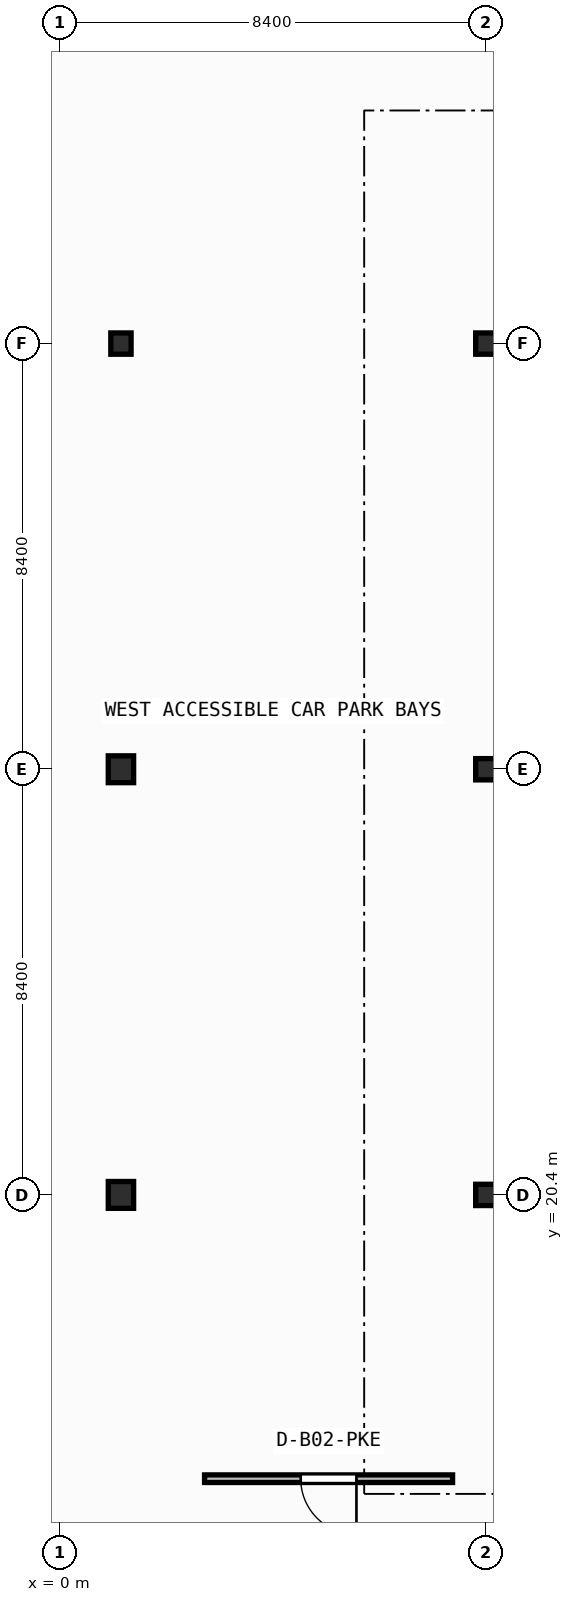
"""IFC4 building model, lengths in metres.
Left out: names, types, materials, properties, quantities, classifications, styles, units other than length and angle.
Written with IfcOpenShell. Run it as: python <this file> out.ifc"""

import sys

from ifc_helpers import new_model, si_unit, direction, frame, frame_2d, origin, origin_2d, place, context, subcontext, project, spatial, rectangle, i_section, extrude, element, fill, save


model = new_model("IFC4")
c1 = context("Model", 3, precision=1e-05, world=origin(), true_north=direction((0.0, 1.0)))
c2 = subcontext(c1, "Body", "Model", "MODEL_VIEW")
j1 = project(units=[si_unit("LENGTHUNIT", "METRE"), si_unit("PLANEANGLEUNIT", "RADIAN")], contexts=[c1])
p1 = place(None, origin())
s1 = spatial("IfcSite", under=j1, at=p1, CompositionType="ELEMENT")
p2 = place(p1, origin())
s2 = spatial("IfcBuilding", under=s1, at=p2, CompositionType="ELEMENT")
p3 = place(p2, frame((0.0, 0.0, -9.0)))
s3 = spatial("IfcBuildingStorey", under=s2, at=p3, CompositionType="ELEMENT", Elevation=-9.0)
p4 = place(p3, frame((1.2, 20.4, 0.0), z_axis=(0.0, 0.0, 1.0), x_axis=(1.0, 0.0, 0.0)))
e1 = element("IfcColumn", 1, at=p4, inside=s3, PredefinedType="COLUMN", context=c2, shape_type="SweptSolid", body=[
    extrude(i_section(OverallWidth=0.5, OverallDepth=0.53, WebThickness=0.028, FlangeThickness=0.045, at=origin_2d()), origin(), (0.0, 0.0, 1.0), 4.5),
])
p5 = place(p3, frame((8.4, 20.4, 0.0), z_axis=(0.0, 0.0, 1.0), x_axis=(1.0, 0.0, 0.0)))
e2 = element("IfcColumn", 2, at=p5, inside=s3, PredefinedType="COLUMN", context=c2, shape_type="SweptSolid", body=[
    extrude(i_section(OverallWidth=0.4, OverallDepth=0.42, WebThickness=0.025, FlangeThickness=0.04, at=origin_2d()), origin(), (0.0, 0.0, 1.0), 4.5),
])
p6 = place(p3, frame((1.2, 28.8, 0.0), z_axis=(0.0, 0.0, 1.0), x_axis=(1.0, 0.0, 0.0)))
e3 = element("IfcColumn", 3, at=p6, inside=s3, PredefinedType="COLUMN", context=c2, shape_type="SweptSolid", body=[
    extrude(i_section(OverallWidth=0.5, OverallDepth=0.53, WebThickness=0.028, FlangeThickness=0.045, at=origin_2d()), origin(), (0.0, 0.0, 1.0), 4.5),
])
for number, where, z_axis, x_axis in (
    (4, (8.4, 28.8, 0.0), (0.0, 0.0, 1.0), (1.0, 0.0, 0.0)),
    (5, (1.2, 37.2, 0.0), (0.0, 0.0, 1.0), (1.0, 0.0, 0.0)),
    (6, (8.4, 37.2, 0.0), (0.0, 0.0, 1.0), (1.0, 0.0, 0.0)),
):
    element("IfcColumn", number, at=place(p3, frame(where, z_axis=z_axis, x_axis=x_axis)), inside=s3, PredefinedType="COLUMN", context=c2, shape_type="SweptSolid", body=[
        extrude(i_section(OverallWidth=0.4, OverallDepth=0.42, WebThickness=0.025, FlangeThickness=0.04, at=origin_2d()), origin(), (0.0, 0.0, 1.0), 4.5),
    ])
p7 = place(p3, frame((7.745, 14.8, 0.0), z_axis=(0.0, 0.0, 1.0), x_axis=(-1.0, 0.0, 0.0)))
e7 = element("IfcWall", 7, at=p7, inside=s3, PredefinedType="PARTITIONING", context=c2, shape_type="SweptSolid", body=[
    extrude(rectangle(XDim=4.895, YDim=0.15, at=frame_2d((2.447, 0.0))), origin(), (0.0, 0.0, 1.0), 4.24),
])
p8 = place(p7, frame((1.897, 0.0, 0.0)))
e8 = element("IfcOpeningElement", 8, at=p8, cuts=e7, PredefinedType="OPENING", context=c2, shape_type="SweptSolid", body=[
    extrude(rectangle(XDim=1.1, YDim=2.1, at=frame_2d((0.55, 1.05))), frame((0.0, 0.085, 0.0), z_axis=(0.0, -1.0, 0.0), x_axis=(1.0, 0.0, 0.0)), (0.0, 0.0, 1.0), 0.17),
])
p9 = place(p8, origin())
e9 = element("IfcDoor", 9, at=p9, inside=s3, OperationType="SINGLE_SWING_LEFT", PredefinedType="DOOR", context=c2, shape_type="SweptSolid", body=[
    extrude(rectangle(XDim=1.1, YDim=2.1, at=frame_2d((0.55, 1.05))), frame((0.0, 0.025, 0.0), z_axis=(0.0, -1.0, 0.0), x_axis=(1.0, 0.0, 0.0)), (0.0, 0.0, 1.0), 0.05),
])
fill(e8, e9)
save(model, sys.argv[1])
